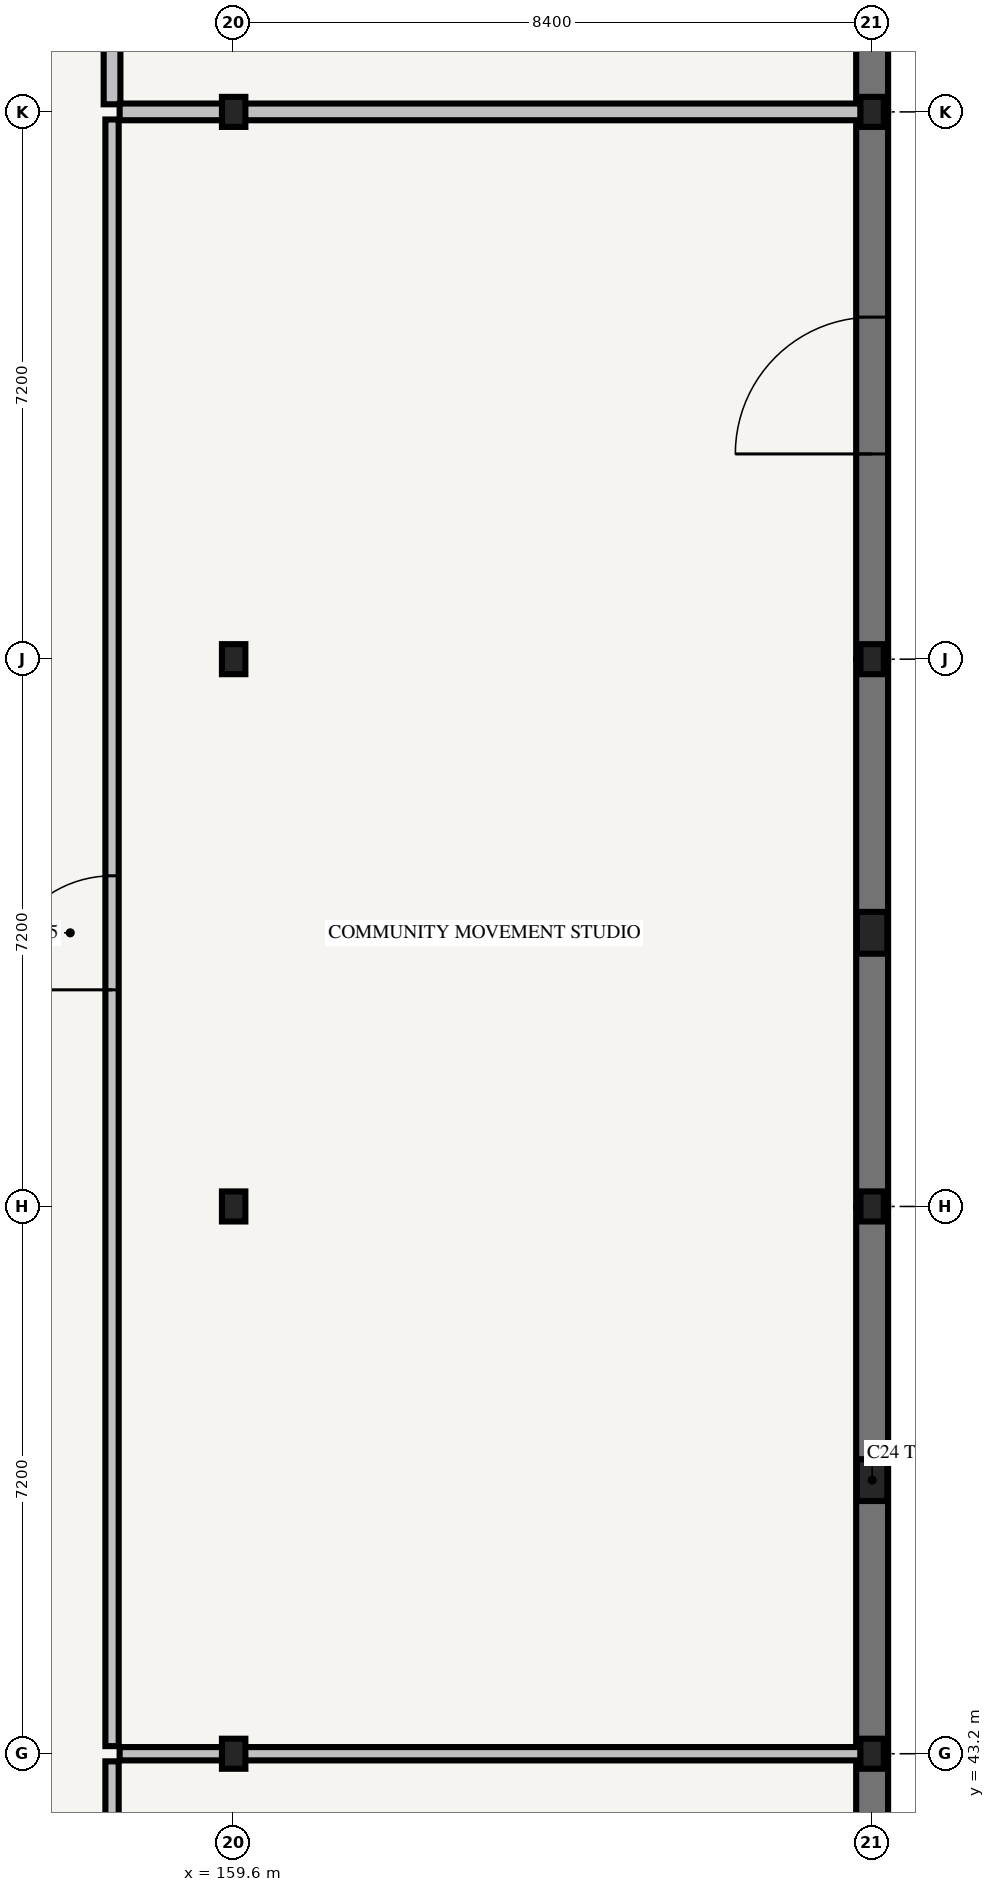
"""IFC4 building model, lengths in metres.
Left out: names, types, materials, properties, quantities, classifications, styles, units other than length and angle.
Written with IfcOpenShell. Run it as: python <this file> out.ifc"""

import sys

from ifc_helpers import new_model, si_unit, direction, frame, frame_2d, origin, origin_2d, place, context, subcontext, project, spatial, rectangle, i_section, extrude, element, fill, save


model = new_model("IFC4")
c1 = context("Model", 3, precision=1e-05, world=origin(), true_north=direction((0.0, 1.0)))
c2 = subcontext(c1, "Body", "Model", "MODEL_VIEW")
j1 = project(units=[si_unit("LENGTHUNIT", "METRE"), si_unit("PLANEANGLEUNIT", "RADIAN")], contexts=[c1])
p1 = place(None, origin())
s1 = spatial("IfcSite", under=j1, at=p1, CompositionType="ELEMENT")
p2 = place(p1, origin())
s2 = spatial("IfcBuilding", under=s1, at=p2, CompositionType="ELEMENT")
p3 = place(p2, origin())
s3 = spatial("IfcBuildingStorey", under=s2, at=p3, CompositionType="ELEMENT", Elevation=0.0)
for number, where, z_axis, x_axis in (
    (1, (159.6, 43.2, -0.42), (0.0, 0.0, 1.0), (1.0, 0.0, 0.0)),
    (2, (159.6, 50.4, -0.42), (0.0, 0.0, 1.0), (1.0, 0.0, 0.0)),
    (3, (159.6, 57.6, -0.42), (0.0, 0.0, 1.0), (1.0, 0.0, 0.0)),
    (4, (159.6, 64.8, -0.42), (0.0, 0.0, 1.0), (1.0, 0.0, 0.0)),
    (5, (168.0, 43.2, -0.42), (0.0, 0.0, 1.0), (1.0, 0.0, 0.0)),
    (6, (168.0, 50.4, -0.42), (0.0, 0.0, 1.0), (1.0, 0.0, 0.0)),
    (7, (168.0, 57.6, -0.42), (0.0, 0.0, 1.0), (1.0, 0.0, 0.0)),
    (8, (168.0, 64.8, -0.42), (0.0, 0.0, 1.0), (1.0, 0.0, 0.0)),
):
    element("IfcColumn", number, at=place(p3, frame(where, z_axis=z_axis, x_axis=x_axis)), inside=s3, PredefinedType="COLUMN", context=c2, shape_type="SweptSolid", body=[
        extrude(i_section(OverallWidth=0.308, OverallDepth=0.395, WebThickness=0.021, FlangeThickness=0.04, FilletRadius=0.027, at=origin_2d()), origin(), (0.0, 0.0, 1.0), 4.92),
    ])
for number, where, z_axis, x_axis in (
    (9, (168.0, 46.8, 0.0), (0.0, 0.0, 1.0), (1.0, 0.0, 0.0)),
    (10, (168.0, 54.0, 0.0), (0.0, 0.0, 1.0), (1.0, 0.0, 0.0)),
):
    element("IfcColumn", number, at=place(p3, frame(where, z_axis=z_axis, x_axis=x_axis)), inside=s3, PredefinedType="PILASTER", context=c2, shape_type="SweptSolid", body=[
        extrude(rectangle(XDim=0.4, YDim=0.55, at=origin_2d()), origin(), (0.0, 0.0, 1.0), 4.5),
    ])
p4 = place(p3, frame((168.0, 36.0, 0.0), z_axis=(0.0, 0.0, 1.0), x_axis=(0.0, 1.0, 0.0)))
e11 = element("IfcWall", 11, at=p4, inside=s3, PredefinedType="SOLIDWALL", context=c2, shape_type="SweptSolid", body=[
    extrude(rectangle(XDim=7.2, YDim=0.42, at=frame_2d((3.6, 0.0))), origin(), (0.0, 0.0, 1.0), 3.755),
])
p5 = place(p4, frame((2.7, 0.0, 0.0)))
e12 = element("IfcOpeningElement", 12, at=p5, cuts=e11, PredefinedType="OPENING", context=c2, shape_type="SweptSolid", body=[
    extrude(rectangle(XDim=1.8, YDim=2.4, at=frame_2d((0.9, 1.2))), frame((0.0, 0.235, 0.0), z_axis=(0.0, -1.0, 0.0), x_axis=(1.0, 0.0, 0.0)), (0.0, 0.0, 1.0), 0.47),
])
p6 = place(p3, frame((168.0, 43.2, 0.0), z_axis=(0.0, 0.0, 1.0), x_axis=(0.0, 1.0, 0.0)))
e13 = element("IfcWall", 13, at=p6, inside=s3, PredefinedType="SOLIDWALL", context=c2, shape_type="SweptSolid", body=[
    extrude(rectangle(XDim=7.2, YDim=0.42, at=frame_2d((3.6, 0.0))), origin(), (0.0, 0.0, 1.0), 3.805),
])
p7 = place(p3, frame((168.0, 50.4, 0.0), z_axis=(0.0, 0.0, 1.0), x_axis=(0.0, 1.0, 0.0)))
e14 = element("IfcWall", 14, at=p7, inside=s3, PredefinedType="SOLIDWALL", context=c2, shape_type="SweptSolid", body=[
    extrude(rectangle(XDim=7.2, YDim=0.42, at=frame_2d((3.6, 0.0))), origin(), (0.0, 0.0, 1.0), 3.705),
])
p8 = place(p3, frame((168.0, 57.6, 0.0), z_axis=(0.0, 0.0, 1.0), x_axis=(0.0, 1.0, 0.0)))
e15 = element("IfcWall", 15, at=p8, inside=s3, PredefinedType="SOLIDWALL", context=c2, shape_type="SweptSolid", body=[
    extrude(rectangle(XDim=7.2, YDim=0.42, at=frame_2d((3.6, 0.0))), origin(), (0.0, 0.0, 1.0), 3.705),
])
p9 = place(p8, frame((2.7, 0.0, 0.0)))
e16 = element("IfcOpeningElement", 16, at=p9, cuts=e15, PredefinedType="OPENING", context=c2, shape_type="SweptSolid", body=[
    extrude(rectangle(XDim=1.8, YDim=2.4, at=frame_2d((0.9, 1.2))), frame((0.0, 0.235, 0.0), z_axis=(0.0, -1.0, 0.0), x_axis=(1.0, 0.0, 0.0)), (0.0, 0.0, 1.0), 0.47),
])
p10 = place(p3, frame((168.0, 64.8, 0.0), z_axis=(0.0, 0.0, 1.0), x_axis=(0.0, 1.0, 0.0)))
e17 = element("IfcWall", 17, at=p10, inside=s3, PredefinedType="SOLIDWALL", context=c2, shape_type="SweptSolid", body=[
    extrude(rectangle(XDim=7.2, YDim=0.42, at=frame_2d((3.6, 0.0))), origin(), (0.0, 0.0, 1.0), 3.755),
])
p11 = place(p3, frame((158.0, 21.6, 0.0), z_axis=(0.0, 0.0, 1.0), x_axis=(0.0, 1.0, 0.0)))
e18 = element("IfcWall", 18, at=p11, inside=s3, PredefinedType="PARTITIONING", context=c2, shape_type="SweptSolid", body=[
    extrude(rectangle(XDim=21.5, YDim=0.175, at=frame_2d((10.75, 0.0))), origin(), (0.0, 0.0, 1.0), 3.62),
])
p12 = place(p11, frame((10.0, 0.0, 0.0)))
e19 = element("IfcOpeningElement", 19, at=p12, cuts=e18, PredefinedType="OPENING", context=c2, shape_type="SweptSolid", body=[
    extrude(rectangle(XDim=1.5, YDim=2.2, at=frame_2d((0.75, 1.1))), frame((0.0, 0.112, 0.0), z_axis=(0.0, -1.0, 0.0), x_axis=(1.0, 0.0, 0.0)), (0.0, 0.0, 1.0), 0.225),
])
p13 = place(p3, frame((158.0, 43.3, 0.0), z_axis=(0.0, 0.0, 1.0), x_axis=(0.0, 1.0, 0.0)))
e20 = element("IfcWall", 20, at=p13, inside=s3, PredefinedType="PARTITIONING", context=c2, shape_type="SweptSolid", body=[
    extrude(rectangle(XDim=21.4, YDim=0.175, at=frame_2d((10.7, 0.0))), origin(), (0.0, 0.0, 1.0), 3.62),
])
p14 = place(p13, frame((9.95, 0.0, 0.0)))
e21 = element("IfcOpeningElement", 21, at=p14, cuts=e20, PredefinedType="OPENING", context=c2, shape_type="SweptSolid", body=[
    extrude(rectangle(XDim=1.5, YDim=2.2, at=frame_2d((0.75, 1.1))), frame((0.0, 0.112, 0.0), z_axis=(0.0, -1.0, 0.0), x_axis=(1.0, 0.0, 0.0)), (0.0, 0.0, 1.0), 0.225),
])
p15 = place(p3, frame((158.1, 43.2, 0.0), z_axis=(0.0, 0.0, 1.0), x_axis=(1.0, 0.0, 0.0)))
e22 = element("IfcWall", 22, at=p15, inside=s3, PredefinedType="PARTITIONING", context=c2, shape_type="SweptSolid", body=[
    extrude(rectangle(XDim=9.75, YDim=0.175, at=frame_2d((4.875, 0.0))), origin(), (0.0, 0.0, 1.0), 3.62),
])
p16 = place(p3, frame((158.0, 64.9, 0.0), z_axis=(0.0, 0.0, 1.0), x_axis=(0.0, 1.0, 0.0)))
e23 = element("IfcWall", 23, at=p16, inside=s3, PredefinedType="PARTITIONING", context=c2, shape_type="SweptSolid", body=[
    extrude(rectangle(XDim=12.15, YDim=0.22, at=frame_2d((6.075, 0.0))), origin(), (0.0, 0.0, 1.0), 3.62),
])
p17 = place(p16, frame((4.55, 0.0, 0.0)))
e24 = element("IfcOpeningElement", 24, at=p17, cuts=e23, PredefinedType="OPENING", context=c2, shape_type="SweptSolid", body=[
    extrude(rectangle(XDim=1.65, YDim=2.3, at=frame_2d((0.825, 1.15))), frame((0.0, 0.135, 0.0), z_axis=(0.0, -1.0, 0.0), x_axis=(1.0, 0.0, 0.0)), (0.0, 0.0, 1.0), 0.27),
])
p18 = place(p3, frame((158.1, 64.8, 0.0), z_axis=(0.0, 0.0, 1.0), x_axis=(1.0, 0.0, 0.0)))
e25 = element("IfcWall", 25, at=p18, inside=s3, PredefinedType="PARTITIONING", context=c2, shape_type="SweptSolid", body=[
    extrude(rectangle(XDim=9.75, YDim=0.22, at=frame_2d((4.875, 0.0))), origin(), (0.0, 0.0, 1.0), 3.62),
])
p19 = place(p9, frame((1.8, 0.0, 0.0), z_axis=(0.0, 0.0, 1.0), x_axis=(-1.0, 0.0, 0.0)))
e26 = element("IfcDoor", 26, at=p19, inside=s3, OperationType="DOUBLE_DOOR_SINGLE_SWING", PredefinedType="DOOR", context=c2, shape_type="SweptSolid", body=[
    extrude(rectangle(XDim=1.8, YDim=2.4, at=frame_2d((0.9, 1.2))), frame((0.0, 0.025, 0.0), z_axis=(0.0, -1.0, 0.0), x_axis=(1.0, 0.0, 0.0)), (0.0, 0.0, 1.0), 0.05),
])
fill(e16, e26)
p20 = place(p14, frame((1.5, 0.0, 0.0), z_axis=(0.0, 0.0, 1.0), x_axis=(-1.0, 0.0, 0.0)))
e27 = element("IfcDoor", 27, at=p20, inside=s3, OperationType="DOUBLE_DOOR_SINGLE_SWING", PredefinedType="DOOR", context=c2, shape_type="SweptSolid", body=[
    extrude(rectangle(XDim=1.5, YDim=2.2, at=frame_2d((0.75, 1.1))), frame((0.0, 0.025, 0.0), z_axis=(0.0, -1.0, 0.0), x_axis=(1.0, 0.0, 0.0)), (0.0, 0.0, 1.0), 0.05),
])
fill(e21, e27)
save(model, sys.argv[1])
